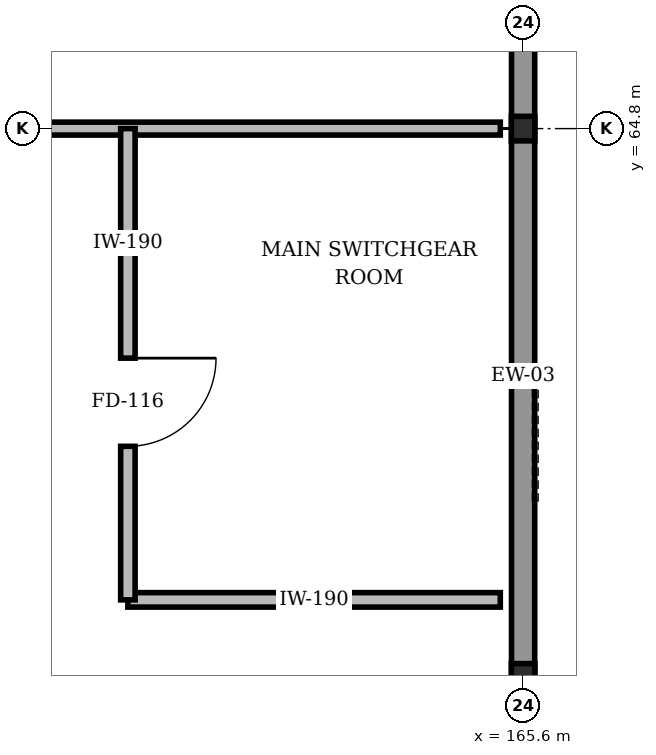
"""IFC4 building model, lengths in metres.
Left out: names, types, materials, properties, quantities, classifications, styles, units other than length and angle.
Written with IfcOpenShell. Run it as: python <this file> out.ifc"""

import sys

from ifc_helpers import new_model, si_unit, direction, frame, frame_2d, origin, origin_2d, place, context, subcontext, project, spatial, rectangle, i_section, extrude, element, fill, save


model = new_model("IFC4")
c1 = context("Model", 3, precision=1e-05, world=origin(), true_north=direction((0.0, 1.0)))
c2 = subcontext(c1, "Body", "Model", "MODEL_VIEW")
j1 = project(units=[si_unit("LENGTHUNIT", "METRE"), si_unit("PLANEANGLEUNIT", "RADIAN")], contexts=[c1])
p1 = place(None, origin())
s1 = spatial("IfcSite", under=j1, at=p1, CompositionType="ELEMENT")
p2 = place(p1, origin())
s2 = spatial("IfcBuilding", under=s1, at=p2, CompositionType="ELEMENT")
p3 = place(p2, origin())
s3 = spatial("IfcBuildingStorey", under=s2, at=p3, CompositionType="ELEMENT", Elevation=0.0)
for number, where, z_axis, x_axis in (
    (1, (165.6, 57.6, 0.0), (0.0, 0.0, 1.0), (1.0, 0.0, 0.0)),
    (2, (165.6, 64.8, 0.0), (0.0, 0.0, 1.0), (1.0, 0.0, 0.0)),
):
    element("IfcColumn", number, at=place(p3, frame(where, z_axis=z_axis, x_axis=x_axis)), inside=s3, PredefinedType="COLUMN", context=c2, shape_type="SweptSolid", body=[
        extrude(i_section(OverallWidth=0.309, OverallDepth=0.323, WebThickness=0.014, FlangeThickness=0.023, at=origin_2d()), origin(), (0.0, 0.0, 1.0), 6.0),
    ])
p4 = place(p3, frame((165.6, 93.6, 0.0), z_axis=(0.0, 0.0, 1.0), x_axis=(0.0, -1.0, 0.0)))
e3 = element("IfcWall", 3, at=p4, inside=s3, PredefinedType="STANDARD", context=c2, shape_type="SweptSolid", body=[
    extrude(rectangle(XDim=50.4, YDim=0.305, at=frame_2d((25.2, 0.0))), origin(), (0.0, 0.0, 1.0), 5.022),
])
p5 = place(p4, frame((44.78, 0.0, 0.0)))
e4 = element("IfcOpeningElement", 4, at=p5, cuts=e3, PredefinedType="OPENING", context=c2, shape_type="SweptSolid", body=[
    extrude(rectangle(XDim=1.82, YDim=2.34, at=frame_2d((0.91, 1.17))), frame((0.0, 0.162, 0.0), z_axis=(0.0, -1.0, 0.0), x_axis=(1.0, 0.0, 0.0)), (0.0, 0.0, 1.0), 0.325),
])
p6 = place(p4, frame((24.22, 0.0, 0.0)))
e5 = element("IfcOpeningElement", 5, at=p6, cuts=e3, PredefinedType="OPENING", context=c2, shape_type="SweptSolid", body=[
    extrude(rectangle(XDim=1.88, YDim=2.36, at=frame_2d((0.94, 1.18))), frame((0.0, 0.162, 0.0), z_axis=(0.0, -1.0, 0.0), x_axis=(1.0, 0.0, 0.0)), (0.0, 0.0, 1.0), 0.325),
])
p7 = place(p4, frame((38.0, 0.0, 2.2)))
e6 = element("IfcOpeningElement", 6, at=p7, cuts=e3, PredefinedType="OPENING", context=c2, shape_type="SweptSolid", body=[
    extrude(rectangle(XDim=3.2, YDim=1.4, at=frame_2d((1.6, 0.7))), frame((0.0, 0.162, 0.0), z_axis=(0.0, -1.0, 0.0), x_axis=(1.0, 0.0, 0.0)), (0.0, 0.0, 1.0), 0.325),
])
p8 = place(p4, frame((18.68, 0.0, 2.2)))
e7 = element("IfcOpeningElement", 7, at=p8, cuts=e3, PredefinedType="OPENING", context=c2, shape_type="SweptSolid", body=[
    extrude(rectangle(XDim=2.12, YDim=1.76, at=frame_2d((1.06, 0.88))), frame((0.0, 0.162, 0.0), z_axis=(0.0, -1.0, 0.0), x_axis=(1.0, 0.0, 0.0)), (0.0, 0.0, 1.0), 0.325),
])
p9 = place(p4, frame((15.68, 0.0, 2.2)))
e8 = element("IfcOpeningElement", 8, at=p9, cuts=e3, PredefinedType="OPENING", context=c2, shape_type="SweptSolid", body=[
    extrude(rectangle(XDim=2.12, YDim=1.76, at=frame_2d((1.06, 0.88))), frame((0.0, 0.162, 0.0), z_axis=(0.0, -1.0, 0.0), x_axis=(1.0, 0.0, 0.0)), (0.0, 0.0, 1.0), 0.325),
])
p10 = place(p4, frame((4.28, 0.0, 2.2)))
e9 = element("IfcOpeningElement", 9, at=p10, cuts=e3, PredefinedType="OPENING", context=c2, shape_type="SweptSolid", body=[
    extrude(rectangle(XDim=2.12, YDim=1.76, at=frame_2d((1.06, 0.88))), frame((0.0, 0.162, 0.0), z_axis=(0.0, -1.0, 0.0), x_axis=(1.0, 0.0, 0.0)), (0.0, 0.0, 1.0), 0.325),
])
p11 = place(p4, frame((1.28, 0.0, 2.2)))
e10 = element("IfcOpeningElement", 10, at=p11, cuts=e3, PredefinedType="OPENING", context=c2, shape_type="SweptSolid", body=[
    extrude(rectangle(XDim=2.12, YDim=1.76, at=frame_2d((1.06, 0.88))), frame((0.0, 0.162, 0.0), z_axis=(0.0, -1.0, 0.0), x_axis=(1.0, 0.0, 0.0)), (0.0, 0.0, 1.0), 0.325),
])
p12 = place(p3, frame((137.1, 64.8, 0.0), z_axis=(0.0, 0.0, 1.0), x_axis=(1.0, 0.0, 0.0)))
e11 = element("IfcWall", 11, at=p12, inside=s3, PredefinedType="STANDARD", context=c2, shape_type="SweptSolid", body=[
    extrude(rectangle(XDim=28.2, YDim=0.17, at=frame_2d((14.1, 0.0))), origin(), (0.0, 0.0, 1.0), 4.864),
])
p13 = place(p3, frame((160.4, 58.6, 0.0), z_axis=(0.0, 0.0, 1.0), x_axis=(1.0, 0.0, 0.0)))
e12 = element("IfcWall", 12, at=p13, inside=s3, PredefinedType="STANDARD", context=c2, shape_type="SweptSolid", body=[
    extrude(rectangle(XDim=4.9, YDim=0.19, at=frame_2d((2.45, 0.0))), origin(), (0.0, 0.0, 1.0), 5.258),
])
p14 = place(p3, frame((160.4, 64.8, 0.0), z_axis=(0.0, 0.0, 1.0), x_axis=(0.0, -1.0, 0.0)))
e13 = element("IfcWall", 13, at=p14, inside=s3, PredefinedType="STANDARD", context=c2, shape_type="SweptSolid", body=[
    extrude(rectangle(XDim=6.2, YDim=0.19, at=frame_2d((3.1, 0.0))), origin(), (0.0, 0.0, 1.0), 5.022),
])
p15 = place(p14, frame((3.02, 0.0, 0.0)))
e14 = element("IfcOpeningElement", 14, at=p15, cuts=e13, PredefinedType="OPENING", context=c2, shape_type="SweptSolid", body=[
    extrude(rectangle(XDim=1.16, YDim=2.18, at=frame_2d((0.58, 1.09))), frame((0.0, 0.105, 0.0), z_axis=(0.0, -1.0, 0.0), x_axis=(1.0, 0.0, 0.0)), (0.0, 0.0, 1.0), 0.21),
])
p16 = place(p15, origin())
e15 = element("IfcDoor", 15, at=p16, inside=s3, OperationType="SINGLE_SWING_LEFT", PredefinedType="DOOR", context=c2, shape_type="SweptSolid", body=[
    extrude(rectangle(XDim=1.16, YDim=2.18, at=frame_2d((0.58, 1.09))), frame((0.0, 0.025, 0.0), z_axis=(0.0, -1.0, 0.0), x_axis=(1.0, 0.0, 0.0)), (0.0, 0.0, 1.0), 0.05),
])
fill(e14, e15)
save(model, sys.argv[1])
